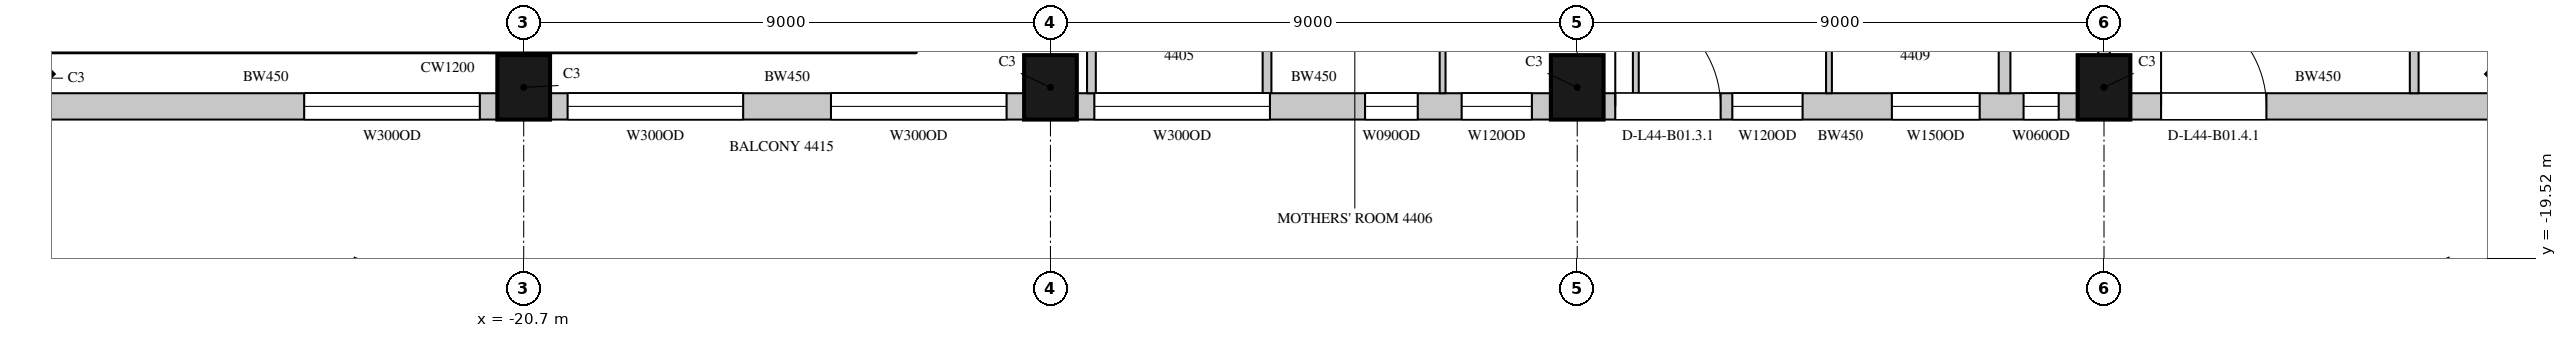
"""IFC4 building model, lengths in metres.
Left out: names, types, materials, properties, quantities, classifications, styles, units other than length and angle.
Written with IfcOpenShell. Run it as: python <this file> out.ifc"""

import sys

from ifc_helpers import new_model, si_unit, direction, frame, frame_2d, origin, origin_2d, place, context, subcontext, project, spatial, rectangle, extrude, element, fill, save


model = new_model("IFC4")
c1 = context("Model", 3, precision=1e-05, world=origin(), true_north=direction((0.0, 1.0)))
c2 = subcontext(c1, "Body", "Model", "MODEL_VIEW")
j1 = project(units=[si_unit("LENGTHUNIT", "METRE"), si_unit("PLANEANGLEUNIT", "RADIAN")], contexts=[c1])
p1 = place(None, origin())
s1 = spatial("IfcSite", under=j1, at=p1, CompositionType="ELEMENT")
p2 = place(p1, origin())
s2 = spatial("IfcBuilding", under=s1, at=p2, CompositionType="ELEMENT")
p3 = place(p2, frame((0.0, 0.0, 201.5)))
s3 = spatial("IfcBuildingStorey", under=s2, at=p3, CompositionType="ELEMENT", Elevation=201.5)
for number, where, z_axis, x_axis in (
    (1, (-29.443, -16.443, 0.0), (0.0, 0.0, 1.0), (0.707, -0.707, 0.0)),
    (2, (-20.7, -16.6, 0.0), (0.0, 0.0, 1.0), (1.0, 0.0, 0.0)),
    (3, (-11.7, -16.6, 0.0), (0.0, 0.0, 1.0), (1.0, 0.0, 0.0)),
    (4, (-2.7, -16.6, 0.0), (0.0, 0.0, 1.0), (1.0, 0.0, 0.0)),
    (5, (6.3, -16.6, 0.0), (0.0, 0.0, 1.0), (1.0, 0.0, 0.0)),
    (6, (13.543, -16.443, 0.0), (0.0, 0.0, 1.0), (0.707, 0.707, 0.0)),
):
    element("IfcColumn", number, at=place(p3, frame(where, z_axis=z_axis, x_axis=x_axis)), inside=s3, PredefinedType="COLUMN", context=c2, shape_type="SweptSolid", body=[
        extrude(rectangle(XDim=0.9, YDim=1.1, at=origin_2d()), origin(), (0.0, 0.0, 1.0), 4.1),
    ])
p4 = place(p3, frame((-29.064, -16.925, 0.0), z_axis=(0.0, 0.0, 1.0), x_axis=(1.0, 0.0, 0.0)))
e7 = element("IfcWall", 7, at=p4, inside=s3, PredefinedType="SOLIDWALL", context=c2, shape_type="SweptSolid", body=[
    extrude(rectangle(XDim=7.914, YDim=0.45, at=frame_2d((3.957, 0.0))), origin(), (0.0, 0.0, 1.0), 3.8),
])
p5 = place(p4, frame((4.614, 0.0, 1.05)))
e8 = element("IfcOpeningElement", 8, at=p5, cuts=e7, PredefinedType="OPENING", context=c2, shape_type="SweptSolid", body=[
    extrude(rectangle(XDim=3.0, YDim=2.4, at=frame_2d((1.5, 1.2))), frame((0.0, 0.235, 0.0), z_axis=(0.0, -1.0, 0.0), x_axis=(1.0, 0.0, 0.0)), (0.0, 0.0, 1.0), 0.47),
])
p6 = place(p3, frame((-20.25, -16.925, 0.0), z_axis=(0.0, 0.0, 1.0), x_axis=(1.0, 0.0, 0.0)))
e9 = element("IfcWall", 9, at=p6, inside=s3, PredefinedType="SOLIDWALL", context=c2, shape_type="SweptSolid", body=[
    extrude(rectangle(XDim=8.1, YDim=0.45, at=frame_2d((4.05, 0.0))), origin(), (0.0, 0.0, 1.0), 3.8),
])
p7 = place(p6, frame((0.3, 0.0, 1.05)))
e10 = element("IfcOpeningElement", 10, at=p7, cuts=e9, PredefinedType="OPENING", context=c2, shape_type="SweptSolid", body=[
    extrude(rectangle(XDim=3.0, YDim=2.4, at=frame_2d((1.5, 1.2))), frame((0.0, 0.235, 0.0), z_axis=(0.0, -1.0, 0.0), x_axis=(1.0, 0.0, 0.0)), (0.0, 0.0, 1.0), 0.47),
])
p8 = place(p6, frame((4.8, 0.0, 1.05)))
e11 = element("IfcOpeningElement", 11, at=p8, cuts=e9, PredefinedType="OPENING", context=c2, shape_type="SweptSolid", body=[
    extrude(rectangle(XDim=3.0, YDim=2.4, at=frame_2d((1.5, 1.2))), frame((0.0, 0.235, 0.0), z_axis=(0.0, -1.0, 0.0), x_axis=(1.0, 0.0, 0.0)), (0.0, 0.0, 1.0), 0.47),
])
p9 = place(p3, frame((-11.25, -16.925, 0.0), z_axis=(0.0, 0.0, 1.0), x_axis=(1.0, 0.0, 0.0)))
e12 = element("IfcWall", 12, at=p9, inside=s3, PredefinedType="SOLIDWALL", context=c2, shape_type="SweptSolid", body=[
    extrude(rectangle(XDim=8.1, YDim=0.45, at=frame_2d((4.05, 0.0))), origin(), (0.0, 0.0, 1.0), 3.8),
])
p10 = place(p9, frame((0.3, 0.0, 1.05)))
e13 = element("IfcOpeningElement", 13, at=p10, cuts=e12, PredefinedType="OPENING", context=c2, shape_type="SweptSolid", body=[
    extrude(rectangle(XDim=3.0, YDim=2.4, at=frame_2d((1.5, 1.2))), frame((0.0, 0.235, 0.0), z_axis=(0.0, -1.0, 0.0), x_axis=(1.0, 0.0, 0.0)), (0.0, 0.0, 1.0), 0.47),
])
p11 = place(p9, frame((4.925, 0.0, 1.05)))
e14 = element("IfcOpeningElement", 14, at=p11, cuts=e12, PredefinedType="OPENING", context=c2, shape_type="SweptSolid", body=[
    extrude(rectangle(XDim=0.9, YDim=2.4, at=frame_2d((0.45, 1.2))), frame((0.0, 0.235, 0.0), z_axis=(0.0, -1.0, 0.0), x_axis=(1.0, 0.0, 0.0)), (0.0, 0.0, 1.0), 0.47),
])
p12 = place(p9, frame((6.575, 0.0, 1.05)))
e15 = element("IfcOpeningElement", 15, at=p12, cuts=e12, PredefinedType="OPENING", context=c2, shape_type="SweptSolid", body=[
    extrude(rectangle(XDim=1.2, YDim=2.4, at=frame_2d((0.6, 1.2))), frame((0.0, 0.235, 0.0), z_axis=(0.0, -1.0, 0.0), x_axis=(1.0, 0.0, 0.0)), (0.0, 0.0, 1.0), 0.47),
])
p13 = place(p3, frame((-2.25, -16.925, 0.0), z_axis=(0.0, 0.0, 1.0), x_axis=(1.0, 0.0, 0.0)))
e16 = element("IfcWall", 16, at=p13, inside=s3, PredefinedType="SOLIDWALL", context=c2, shape_type="SweptSolid", body=[
    extrude(rectangle(XDim=8.1, YDim=0.45, at=frame_2d((4.05, 0.0))), origin(), (0.0, 0.0, 1.0), 3.8),
])
p14 = place(p13, frame((0.2, 0.0, 0.0)))
e17 = element("IfcOpeningElement", 17, at=p14, cuts=e16, PredefinedType="OPENING", context=c2, shape_type="SweptSolid", body=[
    extrude(rectangle(XDim=1.8, YDim=2.4, at=frame_2d((0.9, 1.2))), frame((0.0, 0.235, 0.0), z_axis=(0.0, -1.0, 0.0), x_axis=(1.0, 0.0, 0.0)), (0.0, 0.0, 1.0), 0.47),
])
p15 = place(p13, frame((2.2, 0.0, 1.05)))
e18 = element("IfcOpeningElement", 18, at=p15, cuts=e16, PredefinedType="OPENING", context=c2, shape_type="SweptSolid", body=[
    extrude(rectangle(XDim=1.2, YDim=2.4, at=frame_2d((0.6, 1.2))), frame((0.0, 0.235, 0.0), z_axis=(0.0, -1.0, 0.0), x_axis=(1.0, 0.0, 0.0)), (0.0, 0.0, 1.0), 0.47),
])
p16 = place(p13, frame((4.926, 0.0, 1.05)))
e19 = element("IfcOpeningElement", 19, at=p16, cuts=e16, PredefinedType="OPENING", context=c2, shape_type="SweptSolid", body=[
    extrude(rectangle(XDim=1.5, YDim=2.4, at=frame_2d((0.75, 1.2))), frame((0.0, 0.235, 0.0), z_axis=(0.0, -1.0, 0.0), x_axis=(1.0, 0.0, 0.0)), (0.0, 0.0, 1.0), 0.47),
])
p17 = place(p13, frame((7.176, 0.0, 1.05)))
e20 = element("IfcOpeningElement", 20, at=p17, cuts=e16, PredefinedType="OPENING", context=c2, shape_type="SweptSolid", body=[
    extrude(rectangle(XDim=0.6, YDim=2.4, at=frame_2d((0.3, 1.2))), frame((0.0, 0.235, 0.0), z_axis=(0.0, -1.0, 0.0), x_axis=(1.0, 0.0, 0.0)), (0.0, 0.0, 1.0), 0.47),
])
p18 = place(p3, frame((6.75, -16.925, 0.0), z_axis=(0.0, 0.0, 1.0), x_axis=(1.0, 0.0, 0.0)))
e21 = element("IfcWall", 21, at=p18, inside=s3, PredefinedType="SOLIDWALL", context=c2, shape_type="SweptSolid", body=[
    extrude(rectangle(XDim=6.414, YDim=0.45, at=frame_2d((3.207, 0.0))), origin(), (0.0, 0.0, 1.0), 3.8),
])
p19 = place(p18, frame((0.525, 0.0, 0.0)))
e22 = element("IfcOpeningElement", 22, at=p19, cuts=e21, PredefinedType="OPENING", context=c2, shape_type="SweptSolid", body=[
    extrude(rectangle(XDim=1.8, YDim=2.4, at=frame_2d((0.9, 1.2))), frame((0.0, 0.235, 0.0), z_axis=(0.0, -1.0, 0.0), x_axis=(1.0, 0.0, 0.0)), (0.0, 0.0, 1.0), 0.47),
])
p20 = place(p3, frame((-11.0, -16.7, 0.0), z_axis=(0.0, 0.0, 1.0), x_axis=(0.0, 1.0, 0.0)))
e23 = element("IfcWall", 23, at=p20, inside=s3, PredefinedType="PARTITIONING", context=c2, shape_type="SweptSolid", body=[
    extrude(rectangle(XDim=1.88, YDim=0.15, at=frame_2d((0.94, 0.0))), origin(), (0.0, 0.0, 1.0), 3.8),
])
p21 = place(p3, frame((-8.0, -16.7, 0.0), z_axis=(0.0, 0.0, 1.0), x_axis=(0.0, 1.0, 0.0)))
e24 = element("IfcWall", 24, at=p21, inside=s3, PredefinedType="PARTITIONING", context=c2, shape_type="SweptSolid", body=[
    extrude(rectangle(XDim=4.0, YDim=0.15, at=frame_2d((2.0, 0.0))), origin(), (0.0, 0.0, 1.0), 3.8),
])
p22 = place(p3, frame((11.6, -16.7, 0.0), z_axis=(0.0, 0.0, 1.0), x_axis=(0.0, 1.0, 0.0)))
e25 = element("IfcWall", 25, at=p22, inside=s3, PredefinedType="PARTITIONING", context=c2, shape_type="SweptSolid", body=[
    extrude(rectangle(XDim=4.1, YDim=0.15, at=frame_2d((2.05, 0.0))), origin(), (0.0, 0.0, 1.0), 3.8),
])
p23 = place(p3, frame((4.601, -16.7, 0.0), z_axis=(0.0, 0.0, 1.0), x_axis=(0.0, 1.0, 0.0)))
e26 = element("IfcWall", 26, at=p23, inside=s3, PredefinedType="PARTITIONING", context=c2, shape_type="SweptSolid", body=[
    extrude(rectangle(XDim=4.0, YDim=0.2, at=frame_2d((2.0, 0.0))), origin(), (0.0, 0.0, 1.0), 3.8),
])
p24 = place(p3, frame((6.3, -16.05, 0.0), z_axis=(0.0, 0.0, 1.0), x_axis=(0.0, 1.0, 0.0)))
e27 = element("IfcWall", 27, at=p24, inside=s3, PredefinedType="PARTITIONING", context=c2, shape_type="SweptSolid", body=[
    extrude(rectangle(XDim=3.35, YDim=0.2, at=frame_2d((1.675, 0.0))), origin(), (0.0, 0.0, 1.0), 3.25),
])
for number, where, z_axis, x_axis in (
    (28, (-5.0, -16.7, 0.0), (0.0, 0.0, 1.0), (0.0, 1.0, 0.0)),
    (29, (-1.699, -16.7, 0.0), (0.0, 0.0, 1.0), (0.0, 1.0, 0.0)),
):
    element("IfcWall", number, at=place(p3, frame(where, z_axis=z_axis, x_axis=x_axis)), inside=s3, PredefinedType="PARTITIONING", context=c2, shape_type="SweptSolid", body=[
        extrude(rectangle(XDim=4.0, YDim=0.1, at=frame_2d((2.0, 0.0))), origin(), (0.0, 0.0, 1.0), 3.8),
    ])
p25 = place(p3, frame((1.601, -16.7, 0.0), z_axis=(0.0, 0.0, 1.0), x_axis=(0.0, 1.0, 0.0)))
e30 = element("IfcWall", 30, at=p25, inside=s3, PredefinedType="PARTITIONING", context=c2, shape_type="SweptSolid", body=[
    extrude(rectangle(XDim=4.0, YDim=0.1, at=frame_2d((2.0, 0.0))), origin(), (0.0, 0.0, 1.0), 3.15),
])
p26 = place(p5, origin())
e31 = element("IfcWindow", 31, at=p26, inside=s3, PartitioningType="SINGLE_PANEL", PredefinedType="WINDOW", context=c2, shape_type="SweptSolid", body=[
    extrude(rectangle(XDim=3.0, YDim=2.4, at=frame_2d((1.5, 1.2))), frame((0.0, 0.135, 0.0), z_axis=(0.0, -1.0, 0.0), x_axis=(1.0, 0.0, 0.0)), (0.0, 0.0, 1.0), 0.06),
])
fill(e8, e31)
p27 = place(p7, origin())
e32 = element("IfcWindow", 32, at=p27, inside=s3, PartitioningType="SINGLE_PANEL", PredefinedType="WINDOW", context=c2, shape_type="SweptSolid", body=[
    extrude(rectangle(XDim=3.0, YDim=2.4, at=frame_2d((1.5, 1.2))), frame((0.0, 0.135, 0.0), z_axis=(0.0, -1.0, 0.0), x_axis=(1.0, 0.0, 0.0)), (0.0, 0.0, 1.0), 0.06),
])
fill(e10, e32)
p28 = place(p8, origin())
e33 = element("IfcWindow", 33, at=p28, inside=s3, PartitioningType="SINGLE_PANEL", PredefinedType="WINDOW", context=c2, shape_type="SweptSolid", body=[
    extrude(rectangle(XDim=3.0, YDim=2.4, at=frame_2d((1.5, 1.2))), frame((0.0, 0.135, 0.0), z_axis=(0.0, -1.0, 0.0), x_axis=(1.0, 0.0, 0.0)), (0.0, 0.0, 1.0), 0.06),
])
fill(e11, e33)
p29 = place(p10, origin())
e34 = element("IfcWindow", 34, at=p29, inside=s3, PartitioningType="SINGLE_PANEL", PredefinedType="WINDOW", context=c2, shape_type="SweptSolid", body=[
    extrude(rectangle(XDim=3.0, YDim=2.4, at=frame_2d((1.5, 1.2))), frame((0.0, 0.135, 0.0), z_axis=(0.0, -1.0, 0.0), x_axis=(1.0, 0.0, 0.0)), (0.0, 0.0, 1.0), 0.06),
])
fill(e13, e34)
p30 = place(p14, origin())
e35 = element("IfcDoor", 35, at=p30, inside=s3, OperationType="SLIDING_TO_LEFT", PredefinedType="DOOR", context=c2, shape_type="SweptSolid", body=[
    extrude(rectangle(XDim=1.8, YDim=2.4, at=frame_2d((0.9, 1.2))), frame((0.0, 0.13, 0.0), z_axis=(0.0, -1.0, 0.0), x_axis=(1.0, 0.0, 0.0)), (0.0, 0.0, 1.0), 0.05),
])
fill(e17, e35)
p31 = place(p15, origin())
e36 = element("IfcWindow", 36, at=p31, inside=s3, PartitioningType="SINGLE_PANEL", PredefinedType="WINDOW", context=c2, shape_type="SweptSolid", body=[
    extrude(rectangle(XDim=1.2, YDim=2.4, at=frame_2d((0.6, 1.2))), frame((0.0, 0.135, 0.0), z_axis=(0.0, -1.0, 0.0), x_axis=(1.0, 0.0, 0.0)), (0.0, 0.0, 1.0), 0.06),
])
fill(e18, e36)
p32 = place(p19, origin())
e37 = element("IfcDoor", 37, at=p32, inside=s3, OperationType="SLIDING_TO_LEFT", PredefinedType="DOOR", context=c2, shape_type="SweptSolid", body=[
    extrude(rectangle(XDim=1.8, YDim=2.4, at=frame_2d((0.9, 1.2))), frame((0.0, 0.13, 0.0), z_axis=(0.0, -1.0, 0.0), x_axis=(1.0, 0.0, 0.0)), (0.0, 0.0, 1.0), 0.05),
])
fill(e22, e37)
p33 = place(p11, origin())
e38 = element("IfcWindow", 38, at=p33, inside=s3, PartitioningType="SINGLE_PANEL", PredefinedType="WINDOW", context=c2, shape_type="SweptSolid", body=[
    extrude(rectangle(XDim=0.9, YDim=2.4, at=frame_2d((0.45, 1.2))), frame((0.0, 0.135, 0.0), z_axis=(0.0, -1.0, 0.0), x_axis=(1.0, 0.0, 0.0)), (0.0, 0.0, 1.0), 0.06),
])
fill(e14, e38)
p34 = place(p12, origin())
e39 = element("IfcWindow", 39, at=p34, inside=s3, PartitioningType="SINGLE_PANEL", PredefinedType="WINDOW", context=c2, shape_type="SweptSolid", body=[
    extrude(rectangle(XDim=1.2, YDim=2.4, at=frame_2d((0.6, 1.2))), frame((0.0, 0.135, 0.0), z_axis=(0.0, -1.0, 0.0), x_axis=(1.0, 0.0, 0.0)), (0.0, 0.0, 1.0), 0.06),
])
fill(e15, e39)
p35 = place(p16, origin())
e40 = element("IfcWindow", 40, at=p35, inside=s3, PartitioningType="SINGLE_PANEL", PredefinedType="WINDOW", context=c2, shape_type="SweptSolid", body=[
    extrude(rectangle(XDim=1.5, YDim=2.4, at=frame_2d((0.75, 1.2))), frame((0.0, 0.135, 0.0), z_axis=(0.0, -1.0, 0.0), x_axis=(1.0, 0.0, 0.0)), (0.0, 0.0, 1.0), 0.06),
])
fill(e19, e40)
p36 = place(p17, origin())
e41 = element("IfcWindow", 41, at=p36, inside=s3, PartitioningType="SINGLE_PANEL", PredefinedType="WINDOW", context=c2, shape_type="SweptSolid", body=[
    extrude(rectangle(XDim=0.6, YDim=2.4, at=frame_2d((0.3, 1.2))), frame((0.0, 0.135, 0.0), z_axis=(0.0, -1.0, 0.0), x_axis=(1.0, 0.0, 0.0)), (0.0, 0.0, 1.0), 0.06),
])
fill(e20, e41)
save(model, sys.argv[1])
